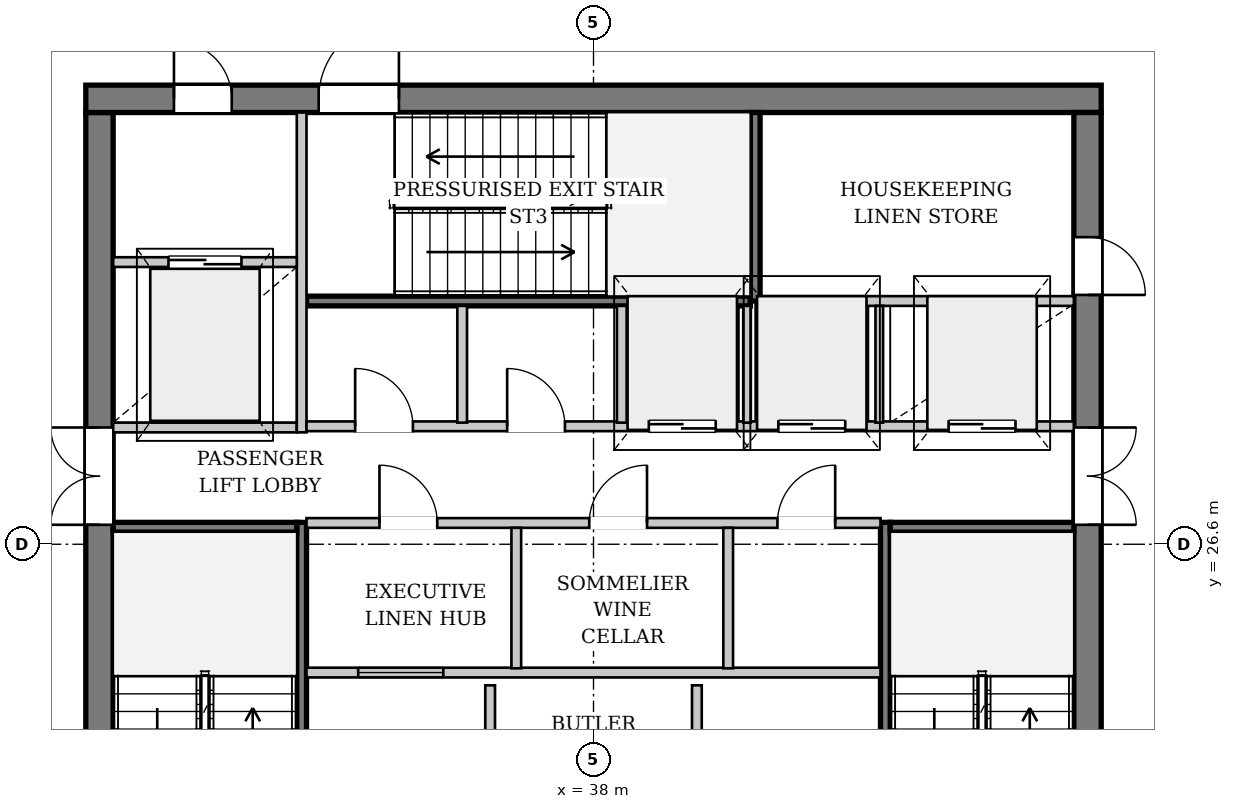
"""IFC4 building model, lengths in metres.
Left out: names, types, materials, properties, quantities, classifications, styles, units other than length and angle.
Written with IfcOpenShell. Run it as: python <this file> out.ifc"""

import sys

from ifc_helpers import new_model, si_unit, direction, frame, frame_2d, origin, place, context, subcontext, project, spatial, rectangle, extrude, source, transform, mapped, element, fill, save


model = new_model("IFC4")
c1 = context("Model", 3, precision=1e-05, world=origin(), true_north=direction((0.0, 1.0)))
c2 = subcontext(c1, "Body", "Model", "MODEL_VIEW")
j1 = project(units=[si_unit("LENGTHUNIT", "METRE"), si_unit("PLANEANGLEUNIT", "RADIAN")], contexts=[c1])
p1 = place(None, origin())
s1 = spatial("IfcSite", under=j1, at=p1, CompositionType="ELEMENT")
p2 = place(p1, origin())
s2 = spatial("IfcBuilding", under=s1, at=p2, CompositionType="ELEMENT")
p3 = place(p2, frame((0.0, 0.0, 286.1)))
s3 = spatial("IfcBuildingStorey", under=s2, at=p3, CompositionType="ELEMENT", Elevation=286.1)
p4 = place(p3, frame((29.875, 19.5, 0.0), z_axis=(0.0, 0.0, 1.0), x_axis=(0.0, 1.0, 0.0)))
e1 = element("IfcWall", 1, at=p4, inside=s3, PredefinedType="SHEAR", context=c2, shape_type="SweptSolid", body=[
    extrude(rectangle(XDim=14.2, YDim=0.45, at=frame_2d((7.1, 0.0))), origin(), (0.0, 0.0, 1.0), 4.12),
])
p5 = place(p4, frame((7.42, 0.0, 0.0)))
e2 = element("IfcOpeningElement", 2, at=p5, cuts=e1, PredefinedType="OPENING", context=c2, shape_type="SweptSolid", body=[
    extrude(rectangle(XDim=1.6, YDim=2.2, at=frame_2d((0.8, 1.1))), frame((0.0, 0.235, 0.0), z_axis=(0.0, -1.0, 0.0), x_axis=(1.0, 0.0, 0.0)), (0.0, 0.0, 1.0), 0.47),
])
p6 = place(p3, frame((29.65, 33.925, 0.0), z_axis=(0.0, 0.0, 1.0), x_axis=(1.0, 0.0, 0.0)))
e3 = element("IfcWall", 3, at=p6, inside=s3, PredefinedType="SHEAR", context=c2, shape_type="SweptSolid", body=[
    extrude(rectangle(XDim=16.7, YDim=0.45, at=frame_2d((8.35, 0.0))), origin(), (0.0, 0.0, 1.0), 4.12),
])
p7 = place(p6, frame((1.45, 0.0, 0.0)))
e4 = element("IfcOpeningElement", 4, at=p7, cuts=e3, PredefinedType="OPENING", context=c2, shape_type="SweptSolid", body=[
    extrude(rectangle(XDim=0.95, YDim=2.1, at=frame_2d((0.475, 1.05))), frame((0.0, 0.235, 0.0), z_axis=(0.0, -1.0, 0.0), x_axis=(1.0, 0.0, 0.0)), (0.0, 0.0, 1.0), 0.47),
])
p8 = place(p6, frame((3.83, 0.0, 0.0)))
e5 = element("IfcOpeningElement", 5, at=p8, cuts=e3, PredefinedType="OPENING", context=c2, shape_type="SweptSolid", body=[
    extrude(rectangle(XDim=1.32, YDim=2.2, at=frame_2d((0.66, 1.1))), frame((0.0, 0.235, 0.0), z_axis=(0.0, -1.0, 0.0), x_axis=(1.0, 0.0, 0.0)), (0.0, 0.0, 1.0), 0.47),
])
p9 = place(p3, frame((46.125, 33.7, 0.0), z_axis=(0.0, 0.0, 1.0), x_axis=(0.0, -1.0, 0.0)))
e6 = element("IfcWall", 6, at=p9, inside=s3, PredefinedType="SHEAR", context=c2, shape_type="SweptSolid", body=[
    extrude(rectangle(XDim=14.2, YDim=0.45, at=frame_2d((7.1, 0.0))), origin(), (0.0, 0.0, 1.0), 4.12),
])
p10 = place(p9, frame((5.18, 0.0, 0.0)))
e7 = element("IfcOpeningElement", 7, at=p10, cuts=e6, PredefinedType="OPENING", context=c2, shape_type="SweptSolid", body=[
    extrude(rectangle(XDim=1.6, YDim=2.2, at=frame_2d((0.8, 1.1))), frame((0.0, 0.235, 0.0), z_axis=(0.0, -1.0, 0.0), x_axis=(1.0, 0.0, 0.0)), (0.0, 0.0, 1.0), 0.47),
])
p11 = place(p9, frame((2.05, 0.0, 0.0)))
e8 = element("IfcOpeningElement", 8, at=p11, cuts=e6, PredefinedType="OPENING", context=c2, shape_type="SweptSolid", body=[
    extrude(rectangle(XDim=0.95, YDim=2.1, at=frame_2d((0.475, 1.05))), frame((0.0, 0.235, 0.0), z_axis=(0.0, -1.0, 0.0), x_axis=(1.0, 0.0, 0.0)), (0.0, 0.0, 1.0), 0.47),
])
p12 = place(p3, frame((33.2, 19.5, 0.0), z_axis=(0.0, 0.0, 1.0), x_axis=(0.0, 1.0, 0.0)))
e9 = element("IfcWall", 9, at=p12, inside=s3, PredefinedType="PARTITIONING", context=c2, shape_type="SweptSolid", body=[
    extrude(rectangle(XDim=7.46, YDim=0.16, at=frame_2d((3.73, 0.0))), origin(), (0.0, 0.0, 1.0), 4.12),
])
p13 = place(p12, frame((0.08, 0.0, 0.0)))
e10 = element("IfcOpeningElement", 10, at=p13, cuts=e9, PredefinedType="OPENING", context=c2, shape_type="SweptSolid", body=[
    extrude(rectangle(XDim=1.32, YDim=2.2, at=frame_2d((0.66, 1.1))), frame((0.0, 0.09, 0.0), z_axis=(0.0, -1.0, 0.0), x_axis=(1.0, 0.0, 0.0)), (0.0, 0.0, 1.0), 0.18),
])
p14 = place(p3, frame((30.1, 26.88, 0.0), z_axis=(0.0, 0.0, 1.0), x_axis=(1.0, 0.0, 0.0)))
e11 = element("IfcWall", 11, at=p14, inside=s3, PredefinedType="PARTITIONING", context=c2, shape_type="SweptSolid", body=[
    extrude(rectangle(XDim=3.02, YDim=0.16, at=frame_2d((1.51, 0.0))), origin(), (0.0, 0.0, 1.0), 4.12),
])
p15 = place(p3, frame((42.8, 26.96, 0.0), z_axis=(0.0, 0.0, 1.0), x_axis=(0.0, -1.0, 0.0)))
e12 = element("IfcWall", 12, at=p15, inside=s3, PredefinedType="PARTITIONING", context=c2, shape_type="SweptSolid", body=[
    extrude(rectangle(XDim=7.46, YDim=0.16, at=frame_2d((3.73, 0.0))), origin(), (0.0, 0.0, 1.0), 4.12),
])
p16 = place(p15, frame((6.06, 0.0, 0.0)))
e13 = element("IfcOpeningElement", 13, at=p16, cuts=e12, PredefinedType="OPENING", context=c2, shape_type="SweptSolid", body=[
    extrude(rectangle(XDim=1.32, YDim=2.2, at=frame_2d((0.66, 1.1))), frame((0.0, 0.09, 0.0), z_axis=(0.0, -1.0, 0.0), x_axis=(1.0, 0.0, 0.0)), (0.0, 0.0, 1.0), 0.18),
])
p17 = place(p3, frame((42.88, 26.88, 0.0), z_axis=(0.0, 0.0, 1.0), x_axis=(1.0, 0.0, 0.0)))
e14 = element("IfcWall", 14, at=p17, inside=s3, PredefinedType="PARTITIONING", context=c2, shape_type="SweptSolid", body=[
    extrude(rectangle(XDim=3.02, YDim=0.16, at=frame_2d((1.51, 0.0))), origin(), (0.0, 0.0, 1.0), 4.12),
])
p18 = place(p3, frame((33.28, 30.6, 0.0), z_axis=(0.0, 0.0, 1.0), x_axis=(1.0, 0.0, 0.0)))
e15 = element("IfcWall", 15, at=p18, inside=s3, PredefinedType="PARTITIONING", context=c2, shape_type="SweptSolid", body=[
    extrude(rectangle(XDim=7.3, YDim=0.16, at=frame_2d((3.65, 0.0))), origin(), (0.0, 0.0, 1.0), 4.12),
])
p19 = place(p3, frame((40.66, 30.6, 0.0), z_axis=(0.0, 0.0, 1.0), x_axis=(0.0, 1.0, 0.0)))
e16 = element("IfcWall", 16, at=p19, inside=s3, PredefinedType="PARTITIONING", context=c2, shape_type="SweptSolid", body=[
    extrude(rectangle(XDim=3.1, YDim=0.16, at=frame_2d((1.55, 0.0))), origin(), (0.0, 0.0, 1.0), 4.12),
])
p20 = place(p3, frame((36.3, 19.5, 0.0), z_axis=(0.0, 0.0, 1.0), x_axis=(0.0, 1.0, 0.0)))
e17 = element("IfcWall", 17, at=p20, inside=s3, PredefinedType="PARTITIONING", context=c2, shape_type="SweptSolid", body=[
    extrude(rectangle(XDim=4.78, YDim=0.16, at=frame_2d((2.39, 0.0))), origin(), (0.0, 0.0, 1.0), 4.12),
])
p21 = place(p20, frame((0.6, 0.0, 0.0)))
e18 = element("IfcOpeningElement", 18, at=p21, cuts=e17, PredefinedType="OPENING", context=c2, shape_type="SweptSolid", body=[
    extrude(rectangle(XDim=1.2, YDim=2.2, at=frame_2d((0.6, 1.1))), frame((0.0, 0.09, 0.0), z_axis=(0.0, -1.0, 0.0), x_axis=(1.0, 0.0, 0.0)), (0.0, 0.0, 1.0), 0.18),
])
p22 = place(p20, frame((2.65, 0.0, 0.0)))
e19 = element("IfcOpeningElement", 19, at=p22, cuts=e17, PredefinedType="OPENING", context=c2, shape_type="SweptSolid", body=[
    extrude(rectangle(XDim=0.95, YDim=2.1, at=frame_2d((0.475, 1.05))), frame((0.0, 0.09, 0.0), z_axis=(0.0, -1.0, 0.0), x_axis=(1.0, 0.0, 0.0)), (0.0, 0.0, 1.0), 0.18),
])
p23 = place(p3, frame((39.7, 24.28, 0.0), z_axis=(0.0, 0.0, 1.0), x_axis=(0.0, -1.0, 0.0)))
e20 = element("IfcWall", 20, at=p23, inside=s3, PredefinedType="PARTITIONING", context=c2, shape_type="SweptSolid", body=[
    extrude(rectangle(XDim=4.78, YDim=0.16, at=frame_2d((2.39, 0.0))), origin(), (0.0, 0.0, 1.0), 4.12),
])
p24 = place(p23, frame((3.12, 0.0, 0.0)))
e21 = element("IfcOpeningElement", 21, at=p24, cuts=e20, PredefinedType="OPENING", context=c2, shape_type="SweptSolid", body=[
    extrude(rectangle(XDim=1.2, YDim=2.2, at=frame_2d((0.6, 1.1))), frame((0.0, 0.09, 0.0), z_axis=(0.0, -1.0, 0.0), x_axis=(1.0, 0.0, 0.0)), (0.0, 0.0, 1.0), 0.18),
])
p25 = place(p3, frame((33.28, 24.49, 0.0), z_axis=(0.0, 0.0, 1.0), x_axis=(1.0, 0.0, 0.0)))
e22 = element("IfcWall", 22, at=p25, inside=s3, PredefinedType="PARTITIONING", context=c2, shape_type="SweptSolid", body=[
    extrude(rectangle(XDim=9.44, YDim=0.16, at=frame_2d((4.72, 0.0))), origin(), (0.0, 0.0, 1.0), 4.12),
])
p26 = place(p25, frame((0.85, 0.0, 0.95)))
e23 = element("IfcOpeningElement", 23, at=p26, cuts=e22, PredefinedType="OPENING", context=c2, shape_type="SweptSolid", body=[
    extrude(rectangle(XDim=1.4, YDim=1.8, at=frame_2d((0.7, 0.9))), frame((0.0, 0.09, 0.0), z_axis=(0.0, -1.0, 0.0), x_axis=(1.0, 0.0, 0.0)), (0.0, 0.0, 1.0), 0.18),
])
p27 = place(p3, frame((30.1, 28.52, 0.0), z_axis=(0.0, 0.0, 1.0), x_axis=(1.0, 0.0, 0.0)))
e24 = element("IfcWall", 24, at=p27, inside=s3, PredefinedType="PARTITIONING", context=c2, shape_type="SweptSolid", body=[
    extrude(rectangle(XDim=3.02, YDim=0.16, at=frame_2d((1.51, 0.0))), origin(), (0.0, 0.0, 1.0), 4.12),
])
p28 = place(p3, frame((33.2, 28.44, 0.0), z_axis=(0.0, 0.0, 1.0), x_axis=(0.0, 1.0, 0.0)))
e25 = element("IfcWall", 25, at=p28, inside=s3, PredefinedType="PARTITIONING", context=c2, shape_type="SweptSolid", body=[
    extrude(rectangle(XDim=5.26, YDim=0.16, at=frame_2d((2.63, 0.0))), origin(), (0.0, 0.0, 1.0), 4.12),
])
p29 = place(p3, frame((30.1, 31.24, 0.0), z_axis=(0.0, 0.0, 1.0), x_axis=(1.0, 0.0, 0.0)))
e26 = element("IfcWall", 26, at=p29, inside=s3, PredefinedType="PARTITIONING", context=c2, shape_type="SweptSolid", body=[
    extrude(rectangle(XDim=3.02, YDim=0.16, at=frame_2d((1.51, 0.0))), origin(), (0.0, 0.0, 1.0), 4.12),
])
p30 = place(p29, frame((0.91, 0.0, 0.0)))
e27 = element("IfcOpeningElement", 27, at=p30, cuts=e26, PredefinedType="OPENING", context=c2, shape_type="SweptSolid", body=[
    extrude(rectangle(XDim=1.2, YDim=2.2, at=frame_2d((0.6, 1.1))), frame((0.0, 0.09, 0.0), z_axis=(0.0, -1.0, 0.0), x_axis=(1.0, 0.0, 0.0)), (0.0, 0.0, 1.0), 0.18),
])
p31 = place(p3, frame((33.28, 26.95, 0.0), z_axis=(0.0, 0.0, 1.0), x_axis=(1.0, 0.0, 0.0)))
e28 = element("IfcWall", 28, at=p31, inside=s3, PredefinedType="PARTITIONING", context=c2, shape_type="SweptSolid", body=[
    extrude(rectangle(XDim=9.44, YDim=0.16, at=frame_2d((4.72, 0.0))), origin(), (0.0, 0.0, 1.0), 4.12),
])
p32 = place(p31, frame((1.2, 0.0, 0.0)))
e29 = element("IfcOpeningElement", 29, at=p32, cuts=e28, PredefinedType="OPENING", context=c2, shape_type="SweptSolid", body=[
    extrude(rectangle(XDim=0.95, YDim=2.1, at=frame_2d((0.475, 1.05))), frame((0.0, 0.09, 0.0), z_axis=(0.0, -1.0, 0.0), x_axis=(1.0, 0.0, 0.0)), (0.0, 0.0, 1.0), 0.18),
])
p33 = place(p31, frame((4.65, 0.0, 0.0)))
e30 = element("IfcOpeningElement", 30, at=p33, cuts=e28, PredefinedType="OPENING", context=c2, shape_type="SweptSolid", body=[
    extrude(rectangle(XDim=0.95, YDim=2.1, at=frame_2d((0.475, 1.05))), frame((0.0, 0.09, 0.0), z_axis=(0.0, -1.0, 0.0), x_axis=(1.0, 0.0, 0.0)), (0.0, 0.0, 1.0), 0.18),
])
p34 = place(p31, frame((7.745, 0.0, 0.0)))
e31 = element("IfcOpeningElement", 31, at=p34, cuts=e28, PredefinedType="OPENING", context=c2, shape_type="SweptSolid", body=[
    extrude(rectangle(XDim=0.95, YDim=2.1, at=frame_2d((0.475, 1.05))), frame((0.0, 0.09, 0.0), z_axis=(0.0, -1.0, 0.0), x_axis=(1.0, 0.0, 0.0)), (0.0, 0.0, 1.0), 0.18),
])
for number, where, z_axis, x_axis in (
    (32, (36.73, 24.56, 0.0), (0.0, 0.0, 1.0), (0.0, 1.0, 0.0)),
    (33, (40.215, 24.56, 0.0), (0.0, 0.0, 1.0), (0.0, 1.0, 0.0)),
):
    element("IfcWall", number, at=place(p3, frame(where, z_axis=z_axis, x_axis=x_axis)), inside=s3, PredefinedType="PARTITIONING", context=c2, shape_type="SweptSolid", body=[
        extrude(rectangle(XDim=2.31, YDim=0.16, at=frame_2d((1.155, 0.0))), origin(), (0.0, 0.0, 1.0), 4.12),
    ])
p35 = place(p3, frame((33.28, 28.54, 0.0), z_axis=(0.0, 0.0, 1.0), x_axis=(1.0, 0.0, 0.0)))
e34 = element("IfcWall", 34, at=p35, inside=s3, PredefinedType="PARTITIONING", context=c2, shape_type="SweptSolid", body=[
    extrude(rectangle(XDim=12.62, YDim=0.16, at=frame_2d((6.31, 0.0))), origin(), (0.0, 0.0, 1.0), 4.12),
])
p36 = place(p35, frame((0.8, 0.0, 0.0)))
e35 = element("IfcOpeningElement", 35, at=p36, cuts=e34, PredefinedType="OPENING", context=c2, shape_type="SweptSolid", body=[
    extrude(rectangle(XDim=0.95, YDim=2.1, at=frame_2d((0.475, 1.05))), frame((0.0, 0.09, 0.0), z_axis=(0.0, -1.0, 0.0), x_axis=(1.0, 0.0, 0.0)), (0.0, 0.0, 1.0), 0.18),
])
p37 = place(p35, frame((3.3, 0.0, 0.0)))
e36 = element("IfcOpeningElement", 36, at=p37, cuts=e34, PredefinedType="OPENING", context=c2, shape_type="SweptSolid", body=[
    extrude(rectangle(XDim=0.95, YDim=2.1, at=frame_2d((0.475, 1.05))), frame((0.0, 0.09, 0.0), z_axis=(0.0, -1.0, 0.0), x_axis=(1.0, 0.0, 0.0)), (0.0, 0.0, 1.0), 0.18),
])
p38 = place(p35, frame((5.63, 0.0, 0.0)))
e37 = element("IfcOpeningElement", 37, at=p38, cuts=e34, PredefinedType="OPENING", context=c2, shape_type="SweptSolid", body=[
    extrude(rectangle(XDim=1.1, YDim=2.2, at=frame_2d((0.55, 1.1))), frame((0.0, 0.09, 0.0), z_axis=(0.0, -1.0, 0.0), x_axis=(1.0, 0.0, 0.0)), (0.0, 0.0, 1.0), 0.18),
])
p39 = place(p35, frame((7.76, 0.0, 0.0)))
e38 = element("IfcOpeningElement", 38, at=p39, cuts=e34, PredefinedType="OPENING", context=c2, shape_type="SweptSolid", body=[
    extrude(rectangle(XDim=1.1, YDim=2.2, at=frame_2d((0.55, 1.1))), frame((0.0, 0.09, 0.0), z_axis=(0.0, -1.0, 0.0), x_axis=(1.0, 0.0, 0.0)), (0.0, 0.0, 1.0), 0.18),
])
p40 = place(p35, frame((10.56, 0.0, 0.0)))
e39 = element("IfcOpeningElement", 39, at=p40, cuts=e34, PredefinedType="OPENING", context=c2, shape_type="SweptSolid", body=[
    extrude(rectangle(XDim=1.1, YDim=2.2, at=frame_2d((0.55, 1.1))), frame((0.0, 0.09, 0.0), z_axis=(0.0, -1.0, 0.0), x_axis=(1.0, 0.0, 0.0)), (0.0, 0.0, 1.0), 0.18),
])
p41 = place(p3, frame((40.72, 30.6, 0.0), z_axis=(0.0, 0.0, 1.0), x_axis=(1.0, 0.0, 0.0)))
e40 = element("IfcWall", 40, at=p41, inside=s3, PredefinedType="PARTITIONING", context=c2, shape_type="SweptSolid", body=[
    extrude(rectangle(XDim=5.18, YDim=0.16, at=frame_2d((2.59, 0.0))), origin(), (0.0, 0.0, 1.0), 4.12),
])
for number, where, z_axis, x_axis in (
    (41, (35.84, 28.6, 0.0), (0.0, 0.0, 1.0), (0.0, 1.0, 0.0)),
    (42, (38.465, 28.6, 0.0), (0.0, 0.0, 1.0), (0.0, 1.0, 0.0)),
):
    element("IfcWall", number, at=place(p3, frame(where, z_axis=z_axis, x_axis=x_axis)), inside=s3, PredefinedType="PARTITIONING", context=c2, shape_type="SweptSolid", body=[
        extrude(rectangle(XDim=1.92, YDim=0.16, at=frame_2d((0.96, 0.0))), origin(), (0.0, 0.0, 1.0), 4.12),
    ])
for number, where, z_axis, x_axis in (
    (43, (40.525, 28.6, 0.0), (0.0, 0.0, 1.0), (0.0, 1.0, 0.0)),
    (44, (42.7, 28.6, 0.0), (0.0, 0.0, 1.0), (0.0, 1.0, 0.0)),
):
    element("IfcWall", number, at=place(p3, frame(where, z_axis=z_axis, x_axis=x_axis)), inside=s3, PredefinedType="PARTITIONING", context=c2, shape_type="SweptSolid", body=[
        extrude(rectangle(XDim=1.92, YDim=0.125, at=frame_2d((0.96, 0.0))), origin(), (0.0, 0.0, 1.0), 4.12),
    ])
m1 = source(origin(), c2, "Body", "SweptSolid", [
    extrude(rectangle(XDim=1.6, YDim=2.2, at=frame_2d((0.8, 1.1))), frame((0.0, 0.025, 0.0), z_axis=(0.0, -1.0, 0.0), x_axis=(1.0, 0.0, 0.0)), (0.0, 0.0, 1.0), 0.05),
])
p42 = place(p5, origin())
e45 = element("IfcDoor", 45, at=p42, inside=s3, OperationType="DOUBLE_DOOR_SINGLE_SWING", PredefinedType="DOOR", context=c2, shape_type="MappedRepresentation", body=[
    mapped(m1, transform((0.0, 0.0, 0.0), x_axis=(1.0, 0.0, 0.0), y_axis=(0.0, 1.0, 0.0), z_axis=(0.0, 0.0, 1.0), scale=1.0)),
])
fill(e2, e45)
m2 = source(origin(), c2, "Body", "SweptSolid", [
    extrude(rectangle(XDim=0.95, YDim=2.1, at=frame_2d((0.475, 1.05))), frame((0.0, 0.025, 0.0), z_axis=(0.0, -1.0, 0.0), x_axis=(1.0, 0.0, 0.0)), (0.0, 0.0, 1.0), 0.05),
])
p43 = place(p7, origin())
e46 = element("IfcDoor", 46, at=p43, inside=s3, OperationType="SINGLE_SWING_LEFT", PredefinedType="DOOR", context=c2, shape_type="MappedRepresentation", body=[
    mapped(m2, transform((0.0, 0.0, 0.0), x_axis=(1.0, 0.0, 0.0), y_axis=(0.0, 1.0, 0.0), z_axis=(0.0, 0.0, 1.0), scale=1.0)),
])
fill(e4, e46)
m3 = source(origin(), c2, "Body", "SweptSolid", [
    extrude(rectangle(XDim=1.32, YDim=2.2, at=frame_2d((0.66, 1.1))), frame((0.0, 0.025, 0.0), z_axis=(0.0, -1.0, 0.0), x_axis=(1.0, 0.0, 0.0)), (0.0, 0.0, 1.0), 0.05),
])
p44 = place(p8, origin())
e47 = element("IfcDoor", 47, at=p44, inside=s3, OperationType="SINGLE_SWING_RIGHT", PredefinedType="DOOR", context=c2, shape_type="MappedRepresentation", body=[
    mapped(m3, transform((0.0, 0.0, 0.0), x_axis=(1.0, 0.0, 0.0), y_axis=(0.0, 1.0, 0.0), z_axis=(0.0, 0.0, 1.0), scale=1.0)),
])
fill(e5, e47)
p45 = place(p10, origin())
e48 = element("IfcDoor", 48, at=p45, inside=s3, OperationType="DOUBLE_DOOR_SINGLE_SWING", PredefinedType="DOOR", context=c2, shape_type="MappedRepresentation", body=[
    mapped(m1, transform((0.0, 0.0, 0.0), x_axis=(1.0, 0.0, 0.0), y_axis=(0.0, 1.0, 0.0), z_axis=(0.0, 0.0, 1.0), scale=1.0)),
])
fill(e7, e48)
m4 = source(origin(), c2, "Body", "SweptSolid", [
    extrude(rectangle(XDim=1.2, YDim=2.2, at=frame_2d((0.6, 1.1))), frame((0.0, 0.025, 0.0), z_axis=(0.0, -1.0, 0.0), x_axis=(1.0, 0.0, 0.0)), (0.0, 0.0, 1.0), 0.05),
])
p46 = place(p30, origin())
e49 = element("IfcDoor", 49, at=p46, inside=s3, OperationType="DOUBLE_DOOR_SLIDING", PredefinedType="DOOR", context=c2, shape_type="MappedRepresentation", body=[
    mapped(m4, transform((0.0, 0.0, 0.0), x_axis=(1.0, 0.0, 0.0), y_axis=(0.0, 1.0, 0.0), z_axis=(0.0, 0.0, 1.0), scale=1.0)),
])
fill(e27, e49)
p47 = place(p32, origin())
e50 = element("IfcDoor", 50, at=p47, inside=s3, OperationType="SINGLE_SWING_LEFT", PredefinedType="DOOR", context=c2, shape_type="MappedRepresentation", body=[
    mapped(m2, transform((0.0, 0.0, 0.0), x_axis=(1.0, 0.0, 0.0), y_axis=(0.0, 1.0, 0.0), z_axis=(0.0, 0.0, 1.0), scale=1.0)),
])
fill(e29, e50)
p48 = place(p33, origin())
e51 = element("IfcDoor", 51, at=p48, inside=s3, OperationType="SINGLE_SWING_RIGHT", PredefinedType="DOOR", context=c2, shape_type="MappedRepresentation", body=[
    mapped(m2, transform((0.0, 0.0, 0.0), x_axis=(1.0, 0.0, 0.0), y_axis=(0.0, 1.0, 0.0), z_axis=(0.0, 0.0, 1.0), scale=1.0)),
])
fill(e30, e51)
p49 = place(p34, origin())
e52 = element("IfcDoor", 52, at=p49, inside=s3, OperationType="SINGLE_SWING_RIGHT", PredefinedType="DOOR", context=c2, shape_type="MappedRepresentation", body=[
    mapped(m2, transform((0.0, 0.0, 0.0), x_axis=(1.0, 0.0, 0.0), y_axis=(0.0, 1.0, 0.0), z_axis=(0.0, 0.0, 1.0), scale=1.0)),
])
fill(e31, e52)
p50 = place(p36, origin())
e53 = element("IfcDoor", 53, at=p50, inside=s3, OperationType="SINGLE_SWING_LEFT", PredefinedType="DOOR", context=c2, shape_type="MappedRepresentation", body=[
    mapped(m2, transform((0.0, 0.0, 0.0), x_axis=(1.0, 0.0, 0.0), y_axis=(0.0, 1.0, 0.0), z_axis=(0.0, 0.0, 1.0), scale=1.0)),
])
fill(e35, e53)
p51 = place(p37, origin())
e54 = element("IfcDoor", 54, at=p51, inside=s3, OperationType="SINGLE_SWING_LEFT", PredefinedType="DOOR", context=c2, shape_type="MappedRepresentation", body=[
    mapped(m2, transform((0.0, 0.0, 0.0), x_axis=(1.0, 0.0, 0.0), y_axis=(0.0, 1.0, 0.0), z_axis=(0.0, 0.0, 1.0), scale=1.0)),
])
fill(e36, e54)
m5 = source(origin(), c2, "Body", "SweptSolid", [
    extrude(rectangle(XDim=1.1, YDim=2.2, at=frame_2d((0.55, 1.1))), frame((0.0, 0.025, 0.0), z_axis=(0.0, -1.0, 0.0), x_axis=(1.0, 0.0, 0.0)), (0.0, 0.0, 1.0), 0.05),
])
p52 = place(p38, origin())
e55 = element("IfcDoor", 55, at=p52, inside=s3, OperationType="DOUBLE_DOOR_SLIDING", PredefinedType="DOOR", context=c2, shape_type="MappedRepresentation", body=[
    mapped(m5, transform((0.0, 0.0, 0.0), x_axis=(1.0, 0.0, 0.0), y_axis=(0.0, 1.0, 0.0), z_axis=(0.0, 0.0, 1.0), scale=1.0)),
])
fill(e37, e55)
p53 = place(p39, origin())
e56 = element("IfcDoor", 56, at=p53, inside=s3, OperationType="DOUBLE_DOOR_SLIDING", PredefinedType="DOOR", context=c2, shape_type="MappedRepresentation", body=[
    mapped(m5, transform((0.0, 0.0, 0.0), x_axis=(1.0, 0.0, 0.0), y_axis=(0.0, 1.0, 0.0), z_axis=(0.0, 0.0, 1.0), scale=1.0)),
])
fill(e38, e56)
p54 = place(p40, origin())
e57 = element("IfcDoor", 57, at=p54, inside=s3, OperationType="DOUBLE_DOOR_SLIDING", PredefinedType="DOOR", context=c2, shape_type="MappedRepresentation", body=[
    mapped(m5, transform((0.0, 0.0, 0.0), x_axis=(1.0, 0.0, 0.0), y_axis=(0.0, 1.0, 0.0), z_axis=(0.0, 0.0, 1.0), scale=1.0)),
])
fill(e39, e57)
p55 = place(p11, origin())
e58 = element("IfcDoor", 58, at=p55, inside=s3, OperationType="SINGLE_SWING_RIGHT", PredefinedType="DOOR", context=c2, shape_type="MappedRepresentation", body=[
    mapped(m2, transform((0.0, 0.0, 0.0), x_axis=(1.0, 0.0, 0.0), y_axis=(0.0, 1.0, 0.0), z_axis=(0.0, 0.0, 1.0), scale=1.0)),
])
fill(e8, e58)
m6 = source(origin(), c2, "Body", "SweptSolid", [
    extrude(rectangle(XDim=1.4, YDim=1.8, at=frame_2d((0.7, 0.9))), frame((0.0, 0.03, 0.0), z_axis=(0.0, -1.0, 0.0), x_axis=(1.0, 0.0, 0.0)), (0.0, 0.0, 1.0), 0.06),
])
p56 = place(p26, origin())
e59 = element("IfcWindow", 59, at=p56, inside=s3, PartitioningType="SINGLE_PANEL", PredefinedType="WINDOW", context=c2, shape_type="MappedRepresentation", body=[
    mapped(m6, transform((0.0, 0.0, 0.0), x_axis=(1.0, 0.0, 0.0), y_axis=(0.0, 1.0, 0.0), z_axis=(0.0, 0.0, 1.0), scale=1.0)),
])
fill(e23, e59)
save(model, sys.argv[1])
